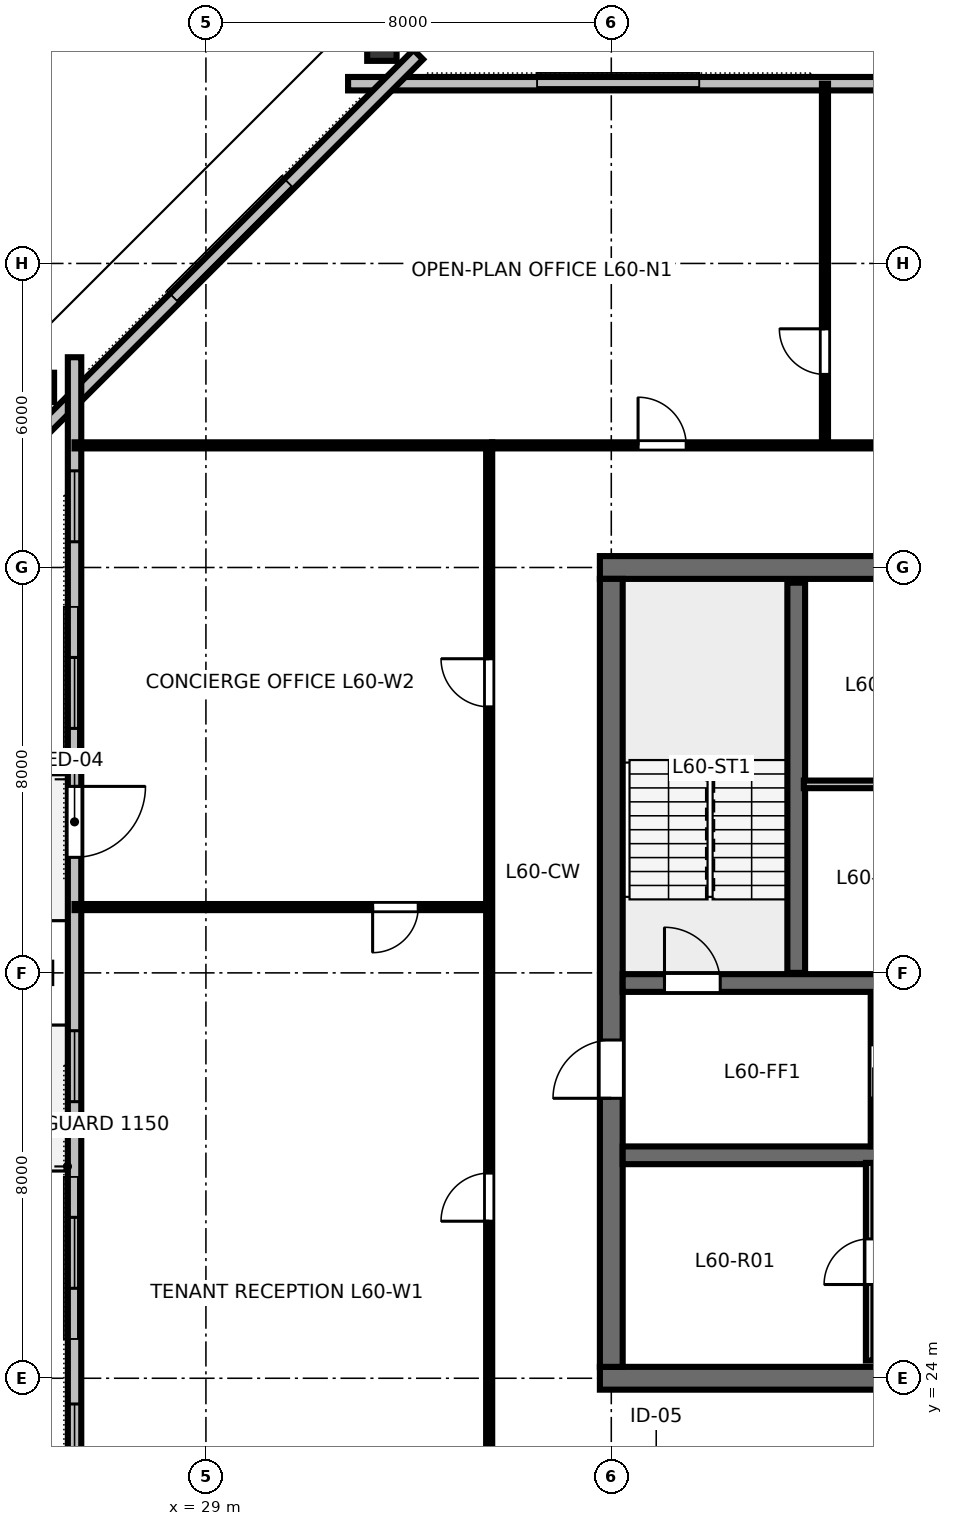
"""IFC4 building model, lengths in metres.
Left out: names, types, materials, properties, quantities, classifications, styles, units other than length and angle.
Written with IfcOpenShell. Run it as: python <this file> out.ifc"""

import sys

from ifc_helpers import new_model, si_unit, direction, frame, frame_2d, origin, origin_2d, place, context, subcontext, project, spatial, rectangle, hollow_rectangle, i_section, extrude, element, fill, save


model = new_model("IFC4")
c1 = context("Model", 3, precision=1e-05, world=origin(), true_north=direction((0.0, 1.0)))
c2 = subcontext(c1, "Body", "Model", "MODEL_VIEW")
j1 = project(units=[si_unit("LENGTHUNIT", "METRE"), si_unit("PLANEANGLEUNIT", "RADIAN")], contexts=[c1])
p1 = place(None, origin())
s1 = spatial("IfcSite", under=j1, at=p1, CompositionType="ELEMENT")
p2 = place(p1, origin())
s2 = spatial("IfcBuilding", under=s1, at=p2, CompositionType="ELEMENT")
p3 = place(p2, frame((0.0, 0.0, 227.4)))
s3 = spatial("IfcBuildingStorey", under=s2, at=p3, CompositionType="ELEMENT", Elevation=227.4)
p4 = place(p3, frame((36.775, 24.0, 0.0), z_axis=(0.0, 0.0, 1.0), x_axis=(1.0, 0.0, 0.0)))
e1 = element("IfcWall", 1, at=p4, inside=s3, PredefinedType="SHEAR", context=c2, shape_type="SweptSolid", body=[
    extrude(rectangle(XDim=18.45, YDim=0.45, at=frame_2d((9.225, 0.0))), origin(), (0.0, 0.0, 1.0), 3.36),
])
p5 = place(p4, frame((13.425, 0.0, 0.0)))
e2 = element("IfcOpeningElement", 2, at=p5, cuts=e1, PredefinedType="OPENING", context=c2, shape_type="SweptSolid", body=[
    extrude(rectangle(XDim=1.6, YDim=2.15, at=frame_2d((0.8, 1.075))), frame((0.0, 0.235, 0.0), z_axis=(0.0, -1.0, 0.0), x_axis=(1.0, 0.0, 0.0)), (0.0, 0.0, 1.0), 0.47),
])
p6 = place(p3, frame((36.775, 40.0, 0.0), z_axis=(0.0, 0.0, 1.0), x_axis=(1.0, 0.0, 0.0)))
e3 = element("IfcWall", 3, at=p6, inside=s3, PredefinedType="SHEAR", context=c2, shape_type="SweptSolid", body=[
    extrude(rectangle(XDim=18.45, YDim=0.45, at=frame_2d((9.225, 0.0))), origin(), (0.0, 0.0, 1.0), 3.36),
])
p7 = place(p6, frame((8.725, 0.0, 0.0)))
e4 = element("IfcOpeningElement", 4, at=p7, cuts=e3, PredefinedType="OPENING", context=c2, shape_type="SweptSolid", body=[
    extrude(rectangle(XDim=1.0, YDim=2.15, at=frame_2d((0.5, 1.075))), frame((0.0, 0.235, 0.0), z_axis=(0.0, -1.0, 0.0), x_axis=(1.0, 0.0, 0.0)), (0.0, 0.0, 1.0), 0.47),
])
p8 = place(p3, frame((37.0, 24.225, 0.0), z_axis=(0.0, 0.0, 1.0), x_axis=(0.0, 1.0, 0.0)))
e5 = element("IfcWall", 5, at=p8, inside=s3, PredefinedType="SHEAR", context=c2, shape_type="SweptSolid", body=[
    extrude(rectangle(XDim=15.55, YDim=0.45, at=frame_2d((7.775, 0.0))), origin(), (0.0, 0.0, 1.0), 3.36),
])
p9 = place(p8, frame((5.3, 0.0, 0.0)))
e6 = element("IfcOpeningElement", 6, at=p9, cuts=e5, PredefinedType="OPENING", context=c2, shape_type="SweptSolid", body=[
    extrude(rectangle(XDim=1.15, YDim=2.15, at=frame_2d((0.575, 1.075))), frame((0.0, 0.235, 0.0), z_axis=(0.0, -1.0, 0.0), x_axis=(1.0, 0.0, 0.0)), (0.0, 0.0, 1.0), 0.47),
])
p10 = place(p3, frame((37.225, 31.8, 0.0), z_axis=(0.0, 0.0, 1.0), x_axis=(1.0, 0.0, 0.0)))
e7 = element("IfcWall", 7, at=p10, inside=s3, PredefinedType="SHEAR", context=c2, shape_type="SweptSolid", body=[
    extrude(rectangle(XDim=17.55, YDim=0.35, at=frame_2d((8.775, 0.0))), origin(), (0.0, 0.0, 1.0), 3.36),
])
p11 = place(p10, frame((0.825, 0.0, 0.0)))
e8 = element("IfcOpeningElement", 8, at=p11, cuts=e7, PredefinedType="OPENING", context=c2, shape_type="SweptSolid", body=[
    extrude(rectangle(XDim=1.1, YDim=2.15, at=frame_2d((0.55, 1.075))), frame((0.0, 0.185, 0.0), z_axis=(0.0, -1.0, 0.0), x_axis=(1.0, 0.0, 0.0)), (0.0, 0.0, 1.0), 0.37),
])
p12 = place(p10, frame((14.725, 0.0, 0.0)))
e9 = element("IfcOpeningElement", 9, at=p12, cuts=e7, PredefinedType="OPENING", context=c2, shape_type="SweptSolid", body=[
    extrude(rectangle(XDim=1.1, YDim=2.15, at=frame_2d((0.55, 1.075))), frame((0.0, 0.185, 0.0), z_axis=(0.0, -1.0, 0.0), x_axis=(1.0, 0.0, 0.0)), (0.0, 0.0, 1.0), 0.37),
])
p13 = place(p3, frame((37.225, 28.4, 0.0), z_axis=(0.0, 0.0, 1.0), x_axis=(1.0, 0.0, 0.0)))
e10 = element("IfcWall", 10, at=p13, inside=s3, PredefinedType="SHEAR", context=c2, shape_type="SweptSolid", body=[
    extrude(rectangle(XDim=17.55, YDim=0.35, at=frame_2d((8.775, 0.0))), origin(), (0.0, 0.0, 1.0), 3.36),
])
p14 = place(p3, frame((32.473, 50.348, 0.0), z_axis=(0.20550333397, -0.12726317196, 0.970346569422), x_axis=(0.526494647851, 0.850178443495, 0.0)))
e11 = element("IfcColumn", 11, at=p14, inside=s3, PredefinedType="COLUMN", context=c2, shape_type="SweptSolid", body=[
    extrude(hollow_rectangle(XDim=0.58, YDim=0.7, WallThickness=0.032, at=origin_2d()), origin(), (0.0, 0.0, 1.0), 3.476),
])
p15 = place(p3, frame((25.653, 43.554, 0.0), z_axis=(0.177516374376, -0.155854312843, 0.971698188738), x_axis=(-0.730201092603, 0.64109572948, 0.236225803001)))
e12 = element("IfcColumn", 12, at=p15, inside=s3, PredefinedType="COLUMN", context=c2, shape_type="SweptSolid", body=[
    extrude(hollow_rectangle(XDim=0.58, YDim=0.7, WallThickness=0.032, at=origin_2d()), origin(), (0.0, 0.0, 1.0), 3.471),
])
p16 = place(p3, frame((25.747, 32.0, 0.0), z_axis=(0.178954370443, 0.0, 0.98385737447), x_axis=(-0.98385737447, 0.0, 0.178954370443)))
e13 = element("IfcColumn", 13, at=p16, inside=s3, PredefinedType="COLUMN", context=c2, shape_type="SweptSolid", body=[
    extrude(i_section(OverallWidth=0.401, OverallDepth=0.399, WebThickness=0.025, FlangeThickness=0.04, FilletRadius=0.025, at=origin_2d()), origin(), (0.0, 0.0, 1.0), 3.428),
])
p17 = place(p3, frame((60.195, 49.547, 0.0), z_axis=(0.0, 0.0, 1.0), x_axis=(-1.0, 0.0, 0.0)))
e14 = element("IfcWall", 14, at=p17, inside=s3, PredefinedType="STANDARD", context=c2, shape_type="SweptSolid", body=[
    extrude(rectangle(XDim=28.389, YDim=0.265, at=frame_2d((14.195, 0.0))), origin(), (0.0, 0.0, 1.0), 2.832),
])
p18 = place(p3, frame((33.191, 50.121, 0.0), z_axis=(0.0, 0.0, 1.0), x_axis=(-0.707106781187, -0.707106781187, 0.0)))
e15 = element("IfcWall", 15, at=p18, inside=s3, PredefinedType="STANDARD", context=c2, shape_type="SweptSolid", body=[
    extrude(rectangle(XDim=10.405, YDim=0.265, at=frame_2d((5.203, 0.0))), origin(), (0.0, 0.0, 1.0), 2.832),
])
p19 = place(p3, frame((26.407, 44.149, 0.0), z_axis=(0.0, 0.0, 1.0), x_axis=(0.0, -1.0, 0.0)))
e16 = element("IfcWall", 16, at=p19, inside=s3, PredefinedType="STANDARD", context=c2, shape_type="SweptSolid", body=[
    extrude(rectangle(XDim=24.298, YDim=0.265, at=frame_2d((12.149, 0.0))), origin(), (0.0, 0.0, 1.0), 2.832),
])
p20 = place(p19, frame((8.469, 0.0, 0.0)))
e17 = element("IfcOpeningElement", 17, at=p20, cuts=e16, PredefinedType="OPENING", context=c2, shape_type="SweptSolid", body=[
    extrude(rectangle(XDim=1.4, YDim=2.15, at=frame_2d((0.7, 1.075))), frame((0.0, 0.142, 0.0), z_axis=(0.0, -1.0, 0.0), x_axis=(1.0, 0.0, 0.0)), (0.0, 0.0, 1.0), 0.285),
])
p21 = place(p19, frame((2.241, 0.0, 0.85)))
e18 = element("IfcOpeningElement", 18, at=p21, cuts=e16, PredefinedType="OPENING", context=c2, shape_type="SweptSolid", body=[
    extrude(rectangle(XDim=1.4, YDim=1.2, at=frame_2d((0.7, 0.6))), frame((0.0, 0.142, 0.0), z_axis=(0.0, -1.0, 0.0), x_axis=(1.0, 0.0, 0.0)), (0.0, 0.0, 1.0), 0.285),
])
p22 = place(p19, frame((5.925, 0.0, 0.85)))
e19 = element("IfcOpeningElement", 19, at=p22, cuts=e16, PredefinedType="OPENING", context=c2, shape_type="SweptSolid", body=[
    extrude(rectangle(XDim=1.4, YDim=1.2, at=frame_2d((0.7, 0.6))), frame((0.0, 0.142, 0.0), z_axis=(0.0, -1.0, 0.0), x_axis=(1.0, 0.0, 0.0)), (0.0, 0.0, 1.0), 0.285),
])
p23 = place(p19, frame((13.291, 0.0, 0.85)))
e20 = element("IfcOpeningElement", 20, at=p23, cuts=e16, PredefinedType="OPENING", context=c2, shape_type="SweptSolid", body=[
    extrude(rectangle(XDim=1.4, YDim=1.2, at=frame_2d((0.7, 0.6))), frame((0.0, 0.142, 0.0), z_axis=(0.0, -1.0, 0.0), x_axis=(1.0, 0.0, 0.0)), (0.0, 0.0, 1.0), 0.285),
])
p24 = place(p19, frame((16.974, 0.0, 0.85)))
e21 = element("IfcOpeningElement", 21, at=p24, cuts=e16, PredefinedType="OPENING", context=c2, shape_type="SweptSolid", body=[
    extrude(rectangle(XDim=1.4, YDim=1.2, at=frame_2d((0.7, 0.6))), frame((0.0, 0.142, 0.0), z_axis=(0.0, -1.0, 0.0), x_axis=(1.0, 0.0, 0.0)), (0.0, 0.0, 1.0), 0.285),
])
p25 = place(p19, frame((20.657, 0.0, 0.85)))
e22 = element("IfcOpeningElement", 22, at=p25, cuts=e16, PredefinedType="OPENING", context=c2, shape_type="SweptSolid", body=[
    extrude(rectangle(XDim=1.4, YDim=1.2, at=frame_2d((0.7, 0.6))), frame((0.0, 0.142, 0.0), z_axis=(0.0, -1.0, 0.0), x_axis=(1.0, 0.0, 0.0)), (0.0, 0.0, 1.0), 0.285),
])
p26 = place(p3, frame((40.65, 32.0, 0.0), z_axis=(0.0, 0.0, 1.0), x_axis=(0.0, 1.0, 0.0)))
e23 = element("IfcWall", 23, at=p26, inside=s3, PredefinedType="SHEAR", context=c2, shape_type="SweptSolid", body=[
    extrude(rectangle(XDim=7.7, YDim=0.35, at=frame_2d((3.85, 0.0))), origin(), (0.0, 0.0, 1.0), 3.6),
])
p27 = place(p3, frame((40.8, 35.72, 0.0), z_axis=(0.0, 0.0, 1.0), x_axis=(1.0, 0.0, 0.0)))
e24 = element("IfcWall", 24, at=p27, inside=s3, PredefinedType="PARTITIONING", context=c2, shape_type="SweptSolid", body=[
    extrude(rectangle(XDim=10.4, YDim=0.15, at=frame_2d((5.2, 0.0))), origin(), (0.0, 0.0, 1.0), 3.375),
])
p28 = place(p27, frame((4.9, 0.0, 0.0)))
e25 = element("IfcOpeningElement", 25, at=p28, cuts=e24, PredefinedType="OPENING", context=c2, shape_type="SweptSolid", body=[
    extrude(rectangle(XDim=0.9, YDim=2.15, at=frame_2d((0.45, 1.075))), frame((0.0, 0.085, 0.0), z_axis=(0.0, -1.0, 0.0), x_axis=(1.0, 0.0, 0.0)), (0.0, 0.0, 1.0), 0.17),
])
p29 = place(p3, frame((42.22, 28.58, 0.0), z_axis=(0.0, 0.0, 1.0), x_axis=(0.0, 1.0, 0.0)))
e26 = element("IfcWall", 26, at=p29, inside=s3, PredefinedType="PARTITIONING", context=c2, shape_type="SweptSolid", body=[
    extrude(rectangle(XDim=3.04, YDim=0.2, at=frame_2d((1.52, 0.0))), origin(), (0.0, 0.0, 1.0), 3.375),
])
p30 = place(p29, frame((0.95, 0.0, 0.0)))
e27 = element("IfcOpeningElement", 27, at=p30, cuts=e26, PredefinedType="OPENING", context=c2, shape_type="SweptSolid", body=[
    extrude(rectangle(XDim=1.05, YDim=2.15, at=frame_2d((0.525, 1.075))), frame((0.0, 0.11, 0.0), z_axis=(0.0, -1.0, 0.0), x_axis=(1.0, 0.0, 0.0)), (0.0, 0.0, 1.0), 0.22),
])
p31 = place(p3, frame((42.1, 24.35, 0.0), z_axis=(0.0, 0.0, 1.0), x_axis=(0.0, 1.0, 0.0)))
e28 = element("IfcWall", 28, at=p31, inside=s3, PredefinedType="PARTITIONING", context=c2, shape_type="SweptSolid", body=[
    extrude(rectangle(XDim=3.9, YDim=0.15, at=frame_2d((1.95, 0.0))), origin(), (0.0, 0.0, 1.0), 3.375),
])
p32 = place(p31, frame((1.5, 0.0, 0.0)))
e29 = element("IfcOpeningElement", 29, at=p32, cuts=e28, PredefinedType="OPENING", context=c2, shape_type="SweptSolid", body=[
    extrude(rectangle(XDim=0.9, YDim=2.15, at=frame_2d((0.45, 1.075))), frame((0.0, 0.085, 0.0), z_axis=(0.0, -1.0, 0.0), x_axis=(1.0, 0.0, 0.0)), (0.0, 0.0, 1.0), 0.17),
])
p33 = place(p3, frame((41.217, 42.41, 0.0), z_axis=(0.0, 0.0, 1.0), x_axis=(0.0, 1.0, 0.0)))
e30 = element("IfcWall", 30, at=p33, inside=s3, PredefinedType="PARTITIONING", context=c2, shape_type="SweptSolid", body=[
    extrude(rectangle(XDim=7.137, YDim=0.12, at=frame_2d((3.569, 0.0))), origin(), (0.0, 0.0, 1.0), 2.655),
])
p34 = place(p33, frame((1.4, 0.0, 0.0)))
e31 = element("IfcOpeningElement", 31, at=p34, cuts=e30, PredefinedType="OPENING", context=c2, shape_type="SweptSolid", body=[
    extrude(rectangle(XDim=0.9, YDim=2.15, at=frame_2d((0.45, 1.075))), frame((0.0, 0.07, 0.0), z_axis=(0.0, -1.0, 0.0), x_axis=(1.0, 0.0, 0.0)), (0.0, 0.0, 1.0), 0.14),
])
p35 = place(p3, frame((34.65, 42.41, 0.0), z_axis=(0.0, 0.0, 1.0), x_axis=(1.0, 0.0, 0.0)))
e32 = element("IfcWall", 32, at=p35, inside=s3, PredefinedType="PARTITIONING", context=c2, shape_type="SweptSolid", body=[
    extrude(rectangle(XDim=10.33, YDim=0.12, at=frame_2d((5.165, 0.0))), origin(), (0.0, 0.0, 1.0), 2.655),
])
p36 = place(p35, frame((2.878, 0.0, 0.0)))
e33 = element("IfcOpeningElement", 33, at=p36, cuts=e32, PredefinedType="OPENING", context=c2, shape_type="SweptSolid", body=[
    extrude(rectangle(XDim=0.95, YDim=2.15, at=frame_2d((0.475, 1.075))), frame((0.0, 0.07, 0.0), z_axis=(0.0, -1.0, 0.0), x_axis=(1.0, 0.0, 0.0)), (0.0, 0.0, 1.0), 0.14),
])
p37 = place(p35, frame((7.974, 0.0, 0.0)))
e34 = element("IfcOpeningElement", 34, at=p37, cuts=e32, PredefinedType="OPENING", context=c2, shape_type="SweptSolid", body=[
    extrude(rectangle(XDim=0.95, YDim=2.15, at=frame_2d((0.475, 1.075))), frame((0.0, 0.07, 0.0), z_axis=(0.0, -1.0, 0.0), x_axis=(1.0, 0.0, 0.0)), (0.0, 0.0, 1.0), 0.14),
])
p38 = place(p3, frame((34.59, 33.299, 0.0), z_axis=(0.0, 0.0, 1.0), x_axis=(-1.0, 0.0, 0.0)))
e35 = element("IfcWall", 35, at=p38, inside=s3, PredefinedType="PARTITIONING", context=c2, shape_type="SweptSolid", body=[
    extrude(rectangle(XDim=8.183, YDim=0.12, at=frame_2d((4.091, 0.0))), origin(), (0.0, 0.0, 1.0), 2.655),
])
p39 = place(p38, frame((1.4, 0.0, 0.0)))
e36 = element("IfcOpeningElement", 36, at=p39, cuts=e35, PredefinedType="OPENING", context=c2, shape_type="SweptSolid", body=[
    extrude(rectangle(XDim=0.9, YDim=2.15, at=frame_2d((0.45, 1.075))), frame((0.0, 0.07, 0.0), z_axis=(0.0, -1.0, 0.0), x_axis=(1.0, 0.0, 0.0)), (0.0, 0.0, 1.0), 0.14),
])
p40 = place(p3, frame((34.59, 21.65, 0.0), z_axis=(0.0, 0.0, 1.0), x_axis=(0.0, 1.0, 0.0)))
e37 = element("IfcWall", 37, at=p40, inside=s3, PredefinedType="PARTITIONING", context=c2, shape_type="SweptSolid", body=[
    extrude(rectangle(XDim=20.7, YDim=0.12, at=frame_2d((10.35, 0.0))), origin(), (0.0, 0.0, 1.0), 2.655),
])
p41 = place(p40, frame((5.449, 0.0, 0.0)))
e38 = element("IfcOpeningElement", 38, at=p41, cuts=e37, PredefinedType="OPENING", context=c2, shape_type="SweptSolid", body=[
    extrude(rectangle(XDim=0.95, YDim=2.15, at=frame_2d((0.475, 1.075))), frame((0.0, 0.07, 0.0), z_axis=(0.0, -1.0, 0.0), x_axis=(1.0, 0.0, 0.0)), (0.0, 0.0, 1.0), 0.14),
])
p42 = place(p40, frame((15.599, 0.0, 0.0)))
e39 = element("IfcOpeningElement", 39, at=p42, cuts=e37, PredefinedType="OPENING", context=c2, shape_type="SweptSolid", body=[
    extrude(rectangle(XDim=0.95, YDim=2.15, at=frame_2d((0.475, 1.075))), frame((0.0, 0.07, 0.0), z_axis=(0.0, -1.0, 0.0), x_axis=(1.0, 0.0, 0.0)), (0.0, 0.0, 1.0), 0.14),
])
p43 = place(p3, frame((34.65, 42.41, 0.0), z_axis=(0.0, 0.0, 1.0), x_axis=(-1.0, 0.0, 0.0)))
e40 = element("IfcWall", 40, at=p43, inside=s3, PredefinedType="PARTITIONING", context=c2, shape_type="SweptSolid", body=[
    extrude(rectangle(XDim=8.243, YDim=0.12, at=frame_2d((4.121, 0.0))), origin(), (0.0, 0.0, 1.0), 2.655),
])
p44 = place(p20, origin())
e41 = element("IfcDoor", 41, at=p44, inside=s3, OperationType="SINGLE_SWING_LEFT", PredefinedType="DOOR", context=c2, shape_type="SweptSolid", body=[
    extrude(rectangle(XDim=1.4, YDim=2.15, at=frame_2d((0.7, 1.075))), frame((0.0, 0.025, 0.0), z_axis=(0.0, -1.0, 0.0), x_axis=(1.0, 0.0, 0.0)), (0.0, 0.0, 1.0), 0.05),
])
fill(e17, e41)
p45 = place(p21, origin())
e42 = element("IfcWindow", 42, at=p45, inside=s3, PartitioningType="SINGLE_PANEL", PredefinedType="WINDOW", context=c2, shape_type="SweptSolid", body=[
    extrude(rectangle(XDim=1.4, YDim=1.2, at=frame_2d((0.7, 0.6))), frame((0.0, 0.03, 0.0), z_axis=(0.0, -1.0, 0.0), x_axis=(1.0, 0.0, 0.0)), (0.0, 0.0, 1.0), 0.06),
])
fill(e18, e42)
p46 = place(p22, origin())
e43 = element("IfcWindow", 43, at=p46, inside=s3, PartitioningType="SINGLE_PANEL", PredefinedType="WINDOW", context=c2, shape_type="SweptSolid", body=[
    extrude(rectangle(XDim=1.4, YDim=1.2, at=frame_2d((0.7, 0.6))), frame((0.0, 0.03, 0.0), z_axis=(0.0, -1.0, 0.0), x_axis=(1.0, 0.0, 0.0)), (0.0, 0.0, 1.0), 0.06),
])
fill(e19, e43)
p47 = place(p23, origin())
e44 = element("IfcWindow", 44, at=p47, inside=s3, PartitioningType="SINGLE_PANEL", PredefinedType="WINDOW", context=c2, shape_type="SweptSolid", body=[
    extrude(rectangle(XDim=1.4, YDim=1.2, at=frame_2d((0.7, 0.6))), frame((0.0, 0.03, 0.0), z_axis=(0.0, -1.0, 0.0), x_axis=(1.0, 0.0, 0.0)), (0.0, 0.0, 1.0), 0.06),
])
fill(e20, e44)
p48 = place(p24, origin())
e45 = element("IfcWindow", 45, at=p48, inside=s3, PartitioningType="SINGLE_PANEL", PredefinedType="WINDOW", context=c2, shape_type="SweptSolid", body=[
    extrude(rectangle(XDim=1.4, YDim=1.2, at=frame_2d((0.7, 0.6))), frame((0.0, 0.03, 0.0), z_axis=(0.0, -1.0, 0.0), x_axis=(1.0, 0.0, 0.0)), (0.0, 0.0, 1.0), 0.06),
])
fill(e21, e45)
p49 = place(p25, origin())
e46 = element("IfcWindow", 46, at=p49, inside=s3, PartitioningType="SINGLE_PANEL", PredefinedType="WINDOW", context=c2, shape_type="SweptSolid", body=[
    extrude(rectangle(XDim=1.4, YDim=1.2, at=frame_2d((0.7, 0.6))), frame((0.0, 0.03, 0.0), z_axis=(0.0, -1.0, 0.0), x_axis=(1.0, 0.0, 0.0)), (0.0, 0.0, 1.0), 0.06),
])
fill(e22, e46)
p50 = place(p11, origin())
e47 = element("IfcDoor", 47, at=p50, inside=s3, OperationType="SINGLE_SWING_LEFT", PredefinedType="DOOR", context=c2, shape_type="SweptSolid", body=[
    extrude(rectangle(XDim=1.1, YDim=2.15, at=frame_2d((0.55, 1.075))), frame((0.0, 0.025, 0.0), z_axis=(0.0, -1.0, 0.0), x_axis=(1.0, 0.0, 0.0)), (0.0, 0.0, 1.0), 0.05),
])
fill(e8, e47)
p51 = place(p9, origin())
e48 = element("IfcDoor", 48, at=p51, inside=s3, OperationType="SINGLE_SWING_LEFT", PredefinedType="DOOR", context=c2, shape_type="SweptSolid", body=[
    extrude(rectangle(XDim=1.15, YDim=2.15, at=frame_2d((0.575, 1.075))), frame((0.0, 0.025, 0.0), z_axis=(0.0, -1.0, 0.0), x_axis=(1.0, 0.0, 0.0)), (0.0, 0.0, 1.0), 0.05),
])
fill(e6, e48)
p52 = place(p32, origin())
e49 = element("IfcDoor", 49, at=p52, inside=s3, OperationType="SINGLE_SWING_LEFT", PredefinedType="DOOR", context=c2, shape_type="SweptSolid", body=[
    extrude(rectangle(XDim=0.9, YDim=2.15, at=frame_2d((0.45, 1.075))), frame((0.0, 0.025, 0.0), z_axis=(0.0, -1.0, 0.0), x_axis=(1.0, 0.0, 0.0)), (0.0, 0.0, 1.0), 0.05),
])
fill(e29, e49)
p53 = place(p34, origin())
e50 = element("IfcDoor", 50, at=p53, inside=s3, OperationType="SINGLE_SWING_RIGHT", PredefinedType="DOOR", context=c2, shape_type="SweptSolid", body=[
    extrude(rectangle(XDim=0.9, YDim=2.15, at=frame_2d((0.45, 1.075))), frame((0.0, 0.025, 0.0), z_axis=(0.0, -1.0, 0.0), x_axis=(1.0, 0.0, 0.0)), (0.0, 0.0, 1.0), 0.05),
])
fill(e31, e50)
p54 = place(p36, origin())
e51 = element("IfcDoor", 51, at=p54, inside=s3, OperationType="SINGLE_SWING_LEFT", PredefinedType="DOOR", context=c2, shape_type="SweptSolid", body=[
    extrude(rectangle(XDim=0.95, YDim=2.15, at=frame_2d((0.475, 1.075))), frame((0.0, 0.025, 0.0), z_axis=(0.0, -1.0, 0.0), x_axis=(1.0, 0.0, 0.0)), (0.0, 0.0, 1.0), 0.05),
])
fill(e33, e51)
p55 = place(p39, origin())
e52 = element("IfcDoor", 52, at=p55, inside=s3, OperationType="SINGLE_SWING_RIGHT", PredefinedType="DOOR", context=c2, shape_type="SweptSolid", body=[
    extrude(rectangle(XDim=0.9, YDim=2.15, at=frame_2d((0.45, 1.075))), frame((0.0, 0.025, 0.0), z_axis=(0.0, -1.0, 0.0), x_axis=(1.0, 0.0, 0.0)), (0.0, 0.0, 1.0), 0.05),
])
fill(e36, e52)
p56 = place(p41, origin())
e53 = element("IfcDoor", 53, at=p56, inside=s3, OperationType="SINGLE_SWING_LEFT", PredefinedType="DOOR", context=c2, shape_type="SweptSolid", body=[
    extrude(rectangle(XDim=0.95, YDim=2.15, at=frame_2d((0.475, 1.075))), frame((0.0, 0.025, 0.0), z_axis=(0.0, -1.0, 0.0), x_axis=(1.0, 0.0, 0.0)), (0.0, 0.0, 1.0), 0.05),
])
fill(e38, e53)
p57 = place(p42, origin())
e54 = element("IfcDoor", 54, at=p57, inside=s3, OperationType="SINGLE_SWING_RIGHT", PredefinedType="DOOR", context=c2, shape_type="SweptSolid", body=[
    extrude(rectangle(XDim=0.95, YDim=2.15, at=frame_2d((0.475, 1.075))), frame((0.0, 0.025, 0.0), z_axis=(0.0, -1.0, 0.0), x_axis=(1.0, 0.0, 0.0)), (0.0, 0.0, 1.0), 0.05),
])
fill(e39, e54)
save(model, sys.argv[1])
